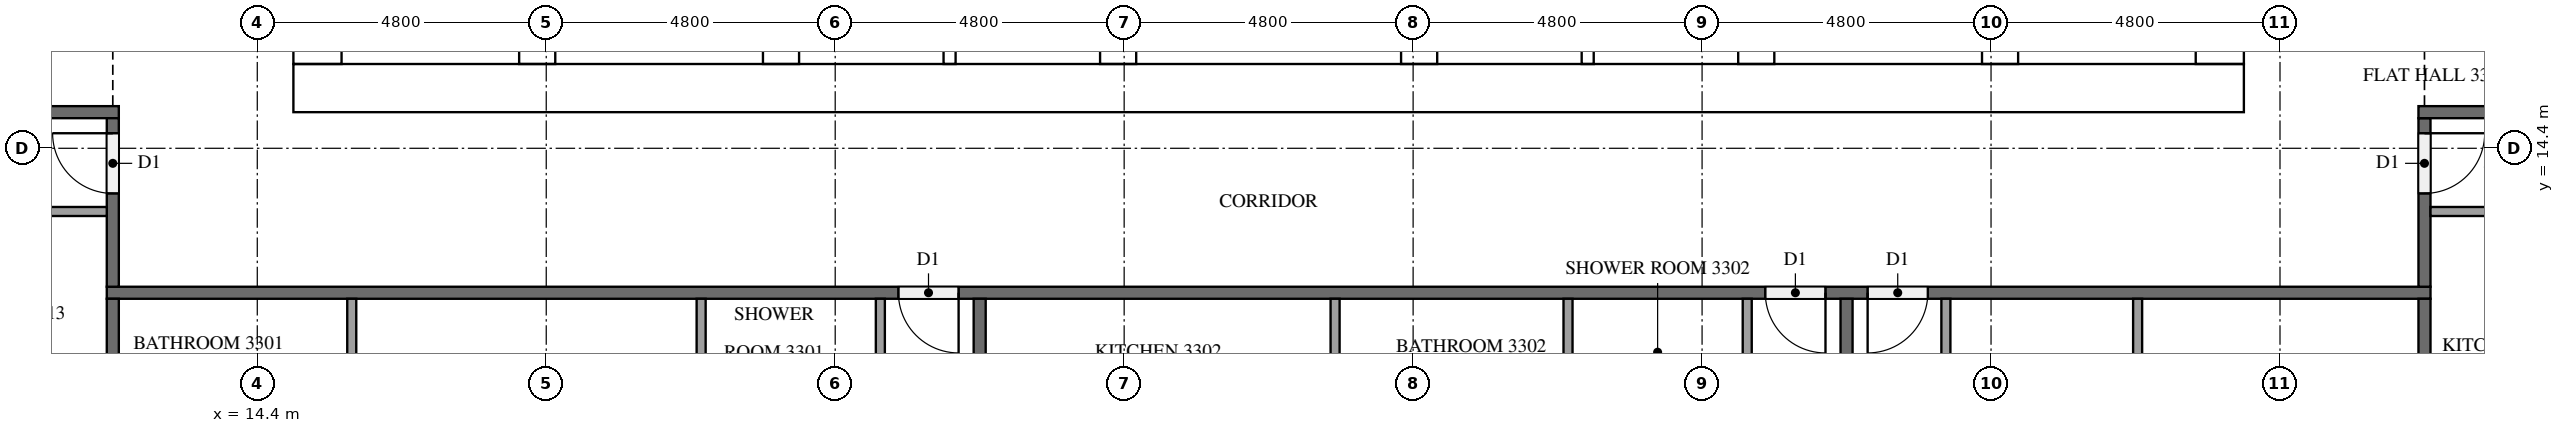
"""IFC4 building model, lengths in metres.
Left out: names, types, materials, properties, quantities, classifications, styles, units other than length and angle.
Written with IfcOpenShell. Run it as: python <this file> out.ifc"""

import sys

from ifc_helpers import new_model, si_unit, direction, frame, frame_2d, origin, place, context, subcontext, project, spatial, rectangle, extrude, element, fill, save


model = new_model("IFC4")
c1 = context("Model", 3, precision=1e-05, world=origin(), true_north=direction((0.0, 1.0)))
c2 = subcontext(c1, "Body", "Model", "MODEL_VIEW")
j1 = project(units=[si_unit("LENGTHUNIT", "METRE"), si_unit("PLANEANGLEUNIT", "RADIAN")], contexts=[c1])
p1 = place(None, origin())
s1 = spatial("IfcSite", under=j1, at=p1, CompositionType="ELEMENT")
p2 = place(p1, origin())
s2 = spatial("IfcBuilding", under=s1, at=p2, CompositionType="ELEMENT")
p3 = place(p2, frame((0.0, 0.0, 129.6)))
s3 = spatial("IfcBuildingStorey", under=s2, at=p3, CompositionType="ELEMENT", Elevation=129.6)
p4 = place(p3, frame((15.0, 15.4, 0.0), z_axis=(0.0, 0.0, 1.0), x_axis=(1.0, 0.0, 0.0)))
e1 = element("IfcWall", 1, at=p4, inside=s3, PredefinedType="SHEAR", context=c2, shape_type="SweptSolid", body=[
    extrude(rectangle(XDim=32.4, YDim=0.8, at=frame_2d((16.2, 0.0))), origin(), (0.0, 0.0, 1.0), 3.2),
])
p5 = place(p4, frame((15.3, 0.0, 0.0)))
e2 = element("IfcOpeningElement", 2, at=p5, cuts=e1, PredefinedType="OPENING", context=c2, shape_type="SweptSolid", body=[
    extrude(rectangle(XDim=1.8, YDim=2.1, at=frame_2d((0.9, 1.05))), frame((0.0, 0.41, 0.0), z_axis=(0.0, -1.0, 0.0), x_axis=(1.0, 0.0, 0.0)), (0.0, 0.0, 1.0), 0.82),
])
p6 = place(p3, frame((15.4, 15.8, 0.0), z_axis=(0.0, 0.0, 1.0), x_axis=(0.0, 1.0, 0.0)))
e3 = element("IfcWall", 3, at=p6, inside=s3, PredefinedType="SHEAR", context=c2, shape_type="SweptSolid", body=[
    extrude(rectangle(XDim=21.2, YDim=0.8, at=frame_2d((10.6, 0.0))), origin(), (0.0, 0.0, 1.0), 3.2),
])
p7 = place(p6, frame((4.96, 0.0, 0.0)))
e4 = element("IfcOpeningElement", 4, at=p7, cuts=e3, PredefinedType="OPENING", context=c2, shape_type="SweptSolid", body=[
    extrude(rectangle(XDim=1.2, YDim=2.1, at=frame_2d((0.6, 1.05))), frame((0.0, 0.41, 0.0), z_axis=(0.0, -1.0, 0.0), x_axis=(1.0, 0.0, 0.0)), (0.0, 0.0, 1.0), 0.82),
])
p8 = place(p3, frame((47.0, 15.8, 0.0), z_axis=(0.0, 0.0, 1.0), x_axis=(0.0, 1.0, 0.0)))
e5 = element("IfcWall", 5, at=p8, inside=s3, PredefinedType="SHEAR", context=c2, shape_type="SweptSolid", body=[
    extrude(rectangle(XDim=21.2, YDim=0.8, at=frame_2d((10.6, 0.0))), origin(), (0.0, 0.0, 1.0), 3.2),
])
p9 = place(p8, frame((10.3, 0.0, 0.0)))
e6 = element("IfcOpeningElement", 6, at=p9, cuts=e5, PredefinedType="OPENING", context=c2, shape_type="SweptSolid", body=[
    extrude(rectangle(XDim=1.2, YDim=2.1, at=frame_2d((0.6, 1.05))), frame((0.0, 0.41, 0.0), z_axis=(0.0, -1.0, 0.0), x_axis=(1.0, 0.0, 0.0)), (0.0, 0.0, 1.0), 0.82),
])
p10 = place(p3, frame((19.05, 15.8, 0.0), z_axis=(0.0, 0.0, 1.0), x_axis=(0.0, 1.0, 0.0)))
e7 = element("IfcWall", 7, at=p10, inside=s3, PredefinedType="SHEAR", context=c2, shape_type="SweptSolid", body=[
    extrude(rectangle(XDim=15.15, YDim=0.6, at=frame_2d((7.575, 0.0))), origin(), (0.0, 0.0, 1.0), 3.2),
])
p11 = place(p10, frame((9.65, 0.0, 0.0)))
e8 = element("IfcOpeningElement", 8, at=p11, cuts=e7, PredefinedType="OPENING", context=c2, shape_type="SweptSolid", body=[
    extrude(rectangle(XDim=1.1, YDim=2.1, at=frame_2d((0.55, 1.05))), frame((0.0, 0.31, 0.0), z_axis=(0.0, -1.0, 0.0), x_axis=(1.0, 0.0, 0.0)), (0.0, 0.0, 1.0), 0.62),
])
p12 = place(p10, frame((13.15, 0.0, 0.0)))
e9 = element("IfcOpeningElement", 9, at=p12, cuts=e7, PredefinedType="OPENING", context=c2, shape_type="SweptSolid", body=[
    extrude(rectangle(XDim=1.1, YDim=2.1, at=frame_2d((0.55, 1.05))), frame((0.0, 0.31, 0.0), z_axis=(0.0, -1.0, 0.0), x_axis=(1.0, 0.0, 0.0)), (0.0, 0.0, 1.0), 0.62),
])
p13 = place(p10, frame((0.4, 0.0, 0.0)))
e10 = element("IfcOpeningElement", 10, at=p13, cuts=e7, PredefinedType="OPENING", context=c2, shape_type="SweptSolid", body=[
    extrude(rectangle(XDim=1.2, YDim=2.1, at=frame_2d((0.6, 1.05))), frame((0.0, 0.31, 0.0), z_axis=(0.0, -1.0, 0.0), x_axis=(1.0, 0.0, 0.0)), (0.0, 0.0, 1.0), 0.62),
])
p14 = place(p3, frame((23.1, 15.8, 0.0), z_axis=(0.0, 0.0, 1.0), x_axis=(0.0, 1.0, 0.0)))
e11 = element("IfcWall", 11, at=p14, inside=s3, PredefinedType="SHEAR", context=c2, shape_type="SweptSolid", body=[
    extrude(rectangle(XDim=21.2, YDim=0.6, at=frame_2d((10.6, 0.0))), origin(), (0.0, 0.0, 1.0), 3.2),
])
p15 = place(p3, frame((39.3, 15.8, 0.0), z_axis=(0.0, 0.0, 1.0), x_axis=(0.0, 1.0, 0.0)))
e12 = element("IfcWall", 12, at=p15, inside=s3, PredefinedType="SHEAR", context=c2, shape_type="SweptSolid", body=[
    extrude(rectangle(XDim=8.45, YDim=0.6, at=frame_2d((4.225, 0.0))), origin(), (0.0, 0.0, 1.0), 3.2),
])
p16 = place(p3, frame((43.35, 15.8, 0.0), z_axis=(0.0, 0.0, 1.0), x_axis=(0.0, 1.0, 0.0)))
e13 = element("IfcWall", 13, at=p16, inside=s3, PredefinedType="SHEAR", context=c2, shape_type="SweptSolid", body=[
    extrude(rectangle(XDim=8.45, YDim=0.6, at=frame_2d((4.225, 0.0))), origin(), (0.0, 0.0, 1.0), 3.2),
])
p17 = place(p16, frame((0.4, 0.0, 0.0)))
e14 = element("IfcOpeningElement", 14, at=p17, cuts=e13, PredefinedType="OPENING", context=c2, shape_type="SweptSolid", body=[
    extrude(rectangle(XDim=1.2, YDim=2.1, at=frame_2d((0.6, 1.05))), frame((0.0, 0.31, 0.0), z_axis=(0.0, -1.0, 0.0), x_axis=(1.0, 0.0, 0.0)), (0.0, 0.0, 1.0), 0.62),
])
for number, where, z_axis, x_axis in (
    (15, (28.7, 15.8, 0.0), (0.0, 0.0, 1.0), (0.0, 1.0, 0.0)),
    (16, (33.7, 15.8, 0.0), (0.0, 0.0, 1.0), (0.0, 1.0, 0.0)),
):
    element("IfcWall", number, at=place(p3, frame(where, z_axis=z_axis, x_axis=x_axis)), inside=s3, PredefinedType="SHEAR", context=c2, shape_type="SweptSolid", body=[
        extrude(rectangle(XDim=2.65, YDim=0.6, at=frame_2d((1.325, 0.0))), origin(), (0.0, 0.0, 1.0), 3.2),
    ])
for number, where, z_axis, x_axis in (
    (17, (25.9, 15.8, 0.0), (0.0, 0.0, 1.0), (0.0, 1.0, 0.0)),
    (18, (36.5, 15.8, 0.0), (0.0, 0.0, 1.0), (0.0, 1.0, 0.0)),
):
    element("IfcWall", number, at=place(p3, frame(where, z_axis=z_axis, x_axis=x_axis)), inside=s3, PredefinedType="SOLIDWALL", context=c2, shape_type="SweptSolid", body=[
        extrude(rectangle(XDim=2.65, YDim=0.2, at=frame_2d((1.325, 0.0))), origin(), (0.0, 0.0, 1.0), 3.2),
    ])
p18 = place(p3, frame((50.5, 12.0, 0.0), z_axis=(0.0, 0.0, 1.0), x_axis=(-1.0, 0.0, 0.0)))
e19 = element("IfcWall", 19, at=p18, inside=s3, PredefinedType="PARTITIONING", context=c2, shape_type="SweptSolid", body=[
    extrude(rectangle(XDim=38.6, YDim=0.2, at=frame_2d((19.3, 0.0))), origin(), (0.0, 0.0, 1.0), 3.2),
])
p19 = place(p18, frame((24.45, 0.0, 0.0)))
e20 = element("IfcOpeningElement", 20, at=p19, cuts=e19, PredefinedType="OPENING", context=c2, shape_type="SweptSolid", body=[
    extrude(rectangle(XDim=1.0, YDim=2.1, at=frame_2d((0.5, 1.05))), frame((0.0, 0.11, 0.0), z_axis=(0.0, -1.0, 0.0), x_axis=(1.0, 0.0, 0.0)), (0.0, 0.0, 1.0), 0.22),
])
p20 = place(p18, frame((10.05, 0.0, 0.0)))
e21 = element("IfcOpeningElement", 21, at=p20, cuts=e19, PredefinedType="OPENING", context=c2, shape_type="SweptSolid", body=[
    extrude(rectangle(XDim=1.0, YDim=2.1, at=frame_2d((0.5, 1.05))), frame((0.0, 0.11, 0.0), z_axis=(0.0, -1.0, 0.0), x_axis=(1.0, 0.0, 0.0)), (0.0, 0.0, 1.0), 0.22),
])
p21 = place(p18, frame((8.35, 0.0, 0.0)))
e22 = element("IfcOpeningElement", 22, at=p21, cuts=e19, PredefinedType="OPENING", context=c2, shape_type="SweptSolid", body=[
    extrude(rectangle(XDim=1.0, YDim=2.1, at=frame_2d((0.5, 1.05))), frame((0.0, 0.11, 0.0), z_axis=(0.0, -1.0, 0.0), x_axis=(1.0, 0.0, 0.0)), (0.0, 0.0, 1.0), 0.22),
])
p22 = place(p3, frame((50.4, 14.9, 0.0), z_axis=(0.0, 0.0, 1.0), x_axis=(0.0, -1.0, 0.0)))
e23 = element("IfcWall", 23, at=p22, inside=s3, PredefinedType="PARTITIONING", context=c2, shape_type="SweptSolid", body=[
    extrude(rectangle(XDim=2.8, YDim=0.2, at=frame_2d((1.4, 0.0))), origin(), (0.0, 0.0, 1.0), 3.2),
])
p23 = place(p22, frame((0.25, 0.0, 0.0)))
e24 = element("IfcOpeningElement", 24, at=p23, cuts=e23, PredefinedType="OPENING", context=c2, shape_type="SweptSolid", body=[
    extrude(rectangle(XDim=1.0, YDim=2.1, at=frame_2d((0.5, 1.05))), frame((0.0, 0.11, 0.0), z_axis=(0.0, -1.0, 0.0), x_axis=(1.0, 0.0, 0.0)), (0.0, 0.0, 1.0), 0.22),
])
p24 = place(p3, frame((50.3, 15.0, 0.0), z_axis=(0.0, 0.0, 1.0), x_axis=(1.0, 0.0, 0.0)))
e25 = element("IfcWall", 25, at=p24, inside=s3, PredefinedType="PARTITIONING", context=c2, shape_type="SweptSolid", body=[
    extrude(rectangle(XDim=2.2, YDim=0.2, at=frame_2d((1.1, 0.0))), origin(), (0.0, 0.0, 1.0), 3.2),
])
p25 = place(p3, frame((9.9, 15.0, 0.0), z_axis=(0.0, 0.0, 1.0), x_axis=(1.0, 0.0, 0.0)))
e26 = element("IfcWall", 26, at=p25, inside=s3, PredefinedType="PARTITIONING", context=c2, shape_type="SweptSolid", body=[
    extrude(rectangle(XDim=2.2, YDim=0.2, at=frame_2d((1.1, 0.0))), origin(), (0.0, 0.0, 1.0), 3.2),
])
p26 = place(p3, frame((12.0, 12.1, 0.0), z_axis=(0.0, 0.0, 1.0), x_axis=(0.0, 1.0, 0.0)))
e27 = element("IfcWall", 27, at=p26, inside=s3, PredefinedType="PARTITIONING", context=c2, shape_type="SweptSolid", body=[
    extrude(rectangle(XDim=2.8, YDim=0.2, at=frame_2d((1.4, 0.0))), origin(), (0.0, 0.0, 1.0), 3.2),
])
p27 = place(p26, frame((1.55, 0.0, 0.0)))
e28 = element("IfcOpeningElement", 28, at=p27, cuts=e27, PredefinedType="OPENING", context=c2, shape_type="SweptSolid", body=[
    extrude(rectangle(XDim=1.0, YDim=2.1, at=frame_2d((0.5, 1.05))), frame((0.0, 0.11, 0.0), z_axis=(0.0, -1.0, 0.0), x_axis=(1.0, 0.0, 0.0)), (0.0, 0.0, 1.0), 0.22),
])
for number, where, z_axis, x_axis in (
    (29, (26.4, 11.9, 0.0), (0.0, 0.0, 1.0), (0.0, -1.0, 0.0)),
    (30, (12.0, 4.9, 0.0), (0.0, 0.0, 1.0), (0.0, 1.0, 0.0)),
    (31, (40.8, 11.9, 0.0), (0.0, 0.0, 1.0), (0.0, -1.0, 0.0)),
    (32, (50.4, 11.9, 0.0), (0.0, 0.0, 1.0), (0.0, -1.0, 0.0)),
):
    element("IfcWall", number, at=place(p3, frame(where, z_axis=z_axis, x_axis=x_axis)), inside=s3, PredefinedType="PARTITIONING", context=c2, shape_type="SweptSolid", body=[
        extrude(rectangle(XDim=7.0, YDim=0.2, at=frame_2d((3.5, 0.0))), origin(), (0.0, 0.0, 1.0), 3.2),
    ])
for number, where, z_axis, x_axis in (
    (33, (21.773, 11.9, 0.0), (0.0, 0.0, 1.0), (0.0, -1.0, 0.0)),
    (34, (15.969, 11.9, 0.0), (0.0, 0.0, 1.0), (0.0, -1.0, 0.0)),
):
    element("IfcWall", number, at=place(p3, frame(where, z_axis=z_axis, x_axis=x_axis)), inside=s3, PredefinedType="PARTITIONING", context=c2, shape_type="SweptSolid", body=[
        extrude(rectangle(XDim=2.075, YDim=0.15, at=frame_2d((1.038, 0.0))), origin(), (0.0, 0.0, 1.0), 3.2),
    ])
p28 = place(p3, frame((24.75, 11.9, 0.0), z_axis=(0.0, 0.0, 1.0), x_axis=(0.0, -1.0, 0.0)))
e35 = element("IfcWall", 35, at=p28, inside=s3, PredefinedType="PARTITIONING", context=c2, shape_type="SweptSolid", body=[
    extrude(rectangle(XDim=2.225, YDim=0.15, at=frame_2d((1.112, 0.0))), origin(), (0.0, 0.0, 1.0), 3.2),
])
for number, where, z_axis, x_axis in (
    (36, (36.173, 11.9, 0.0), (0.0, 0.0, 1.0), (0.0, -1.0, 0.0)),
    (37, (32.304, 11.9, 0.0), (0.0, 0.0, 1.0), (0.0, -1.0, 0.0)),
):
    element("IfcWall", number, at=place(p3, frame(where, z_axis=z_axis, x_axis=x_axis)), inside=s3, PredefinedType="PARTITIONING", context=c2, shape_type="SweptSolid", body=[
        extrude(rectangle(XDim=1.775, YDim=0.15, at=frame_2d((0.887, 0.0))), origin(), (0.0, 0.0, 1.0), 3.2),
    ])
p29 = place(p3, frame((39.15, 11.9, 0.0), z_axis=(0.0, 0.0, 1.0), x_axis=(0.0, -1.0, 0.0)))
e38 = element("IfcWall", 38, at=p29, inside=s3, PredefinedType="PARTITIONING", context=c2, shape_type="SweptSolid", body=[
    extrude(rectangle(XDim=1.925, YDim=0.15, at=frame_2d((0.962, 0.0))), origin(), (0.0, 0.0, 1.0), 3.2),
])
p30 = place(p3, frame((45.635, 11.9, 0.0), z_axis=(0.0, 0.0, 1.0), x_axis=(0.0, -1.0, 0.0)))
e39 = element("IfcWall", 39, at=p30, inside=s3, PredefinedType="PARTITIONING", context=c2, shape_type="SweptSolid", body=[
    extrude(rectangle(XDim=2.075, YDim=0.15, at=frame_2d((1.038, 0.0))), origin(), (0.0, 0.0, 1.0), 3.2),
])
p31 = place(p3, frame((42.45, 11.9, 0.0), z_axis=(0.0, 0.0, 1.0), x_axis=(0.0, -1.0, 0.0)))
e40 = element("IfcWall", 40, at=p31, inside=s3, PredefinedType="PARTITIONING", context=c2, shape_type="SweptSolid", body=[
    extrude(rectangle(XDim=2.225, YDim=0.15, at=frame_2d((1.112, 0.0))), origin(), (0.0, 0.0, 1.0), 3.2),
])
p32 = place(p3, frame((50.5, 13.35, 0.0), z_axis=(0.0, 0.0, 1.0), x_axis=(1.0, 0.0, 0.0)))
e41 = element("IfcWall", 41, at=p32, inside=s3, PredefinedType="PARTITIONING", context=c2, shape_type="SweptSolid", body=[
    extrude(rectangle(XDim=1.925, YDim=0.15, at=frame_2d((0.962, 0.0))), origin(), (0.0, 0.0, 1.0), 3.2),
])
p33 = place(p3, frame((11.9, 13.35, 0.0), z_axis=(0.0, 0.0, 1.0), x_axis=(-1.0, 0.0, 0.0)))
e42 = element("IfcWall", 42, at=p33, inside=s3, PredefinedType="PARTITIONING", context=c2, shape_type="SweptSolid", body=[
    extrude(rectangle(XDim=4.025, YDim=0.15, at=frame_2d((2.012, 0.0))), origin(), (0.0, 0.0, 1.0), 3.2),
])
p34 = place(p5, frame((1.8, 0.0, 0.0), z_axis=(0.0, 0.0, 1.0), x_axis=(-1.0, 0.0, 0.0)))
e43 = element("IfcDoor", 43, at=p34, inside=s3, OperationType="DOUBLE_DOOR_SINGLE_SWING", PredefinedType="DOOR", context=c2, shape_type="SweptSolid", body=[
    extrude(rectangle(XDim=1.8, YDim=2.1, at=frame_2d((0.9, 1.05))), frame((0.0, 0.025, 0.0), z_axis=(0.0, -1.0, 0.0), x_axis=(1.0, 0.0, 0.0)), (0.0, 0.0, 1.0), 0.05),
])
fill(e2, e43)
p35 = place(p19, origin())
e44 = element("IfcDoor", 44, at=p35, inside=s3, OperationType="SINGLE_SWING_LEFT", PredefinedType="DOOR", context=c2, shape_type="SweptSolid", body=[
    extrude(rectangle(XDim=1.0, YDim=2.1, at=frame_2d((0.5, 1.05))), frame((0.0, 0.025, 0.0), z_axis=(0.0, -1.0, 0.0), x_axis=(1.0, 0.0, 0.0)), (0.0, 0.0, 1.0), 0.05),
])
fill(e20, e44)
p36 = place(p20, origin())
e45 = element("IfcDoor", 45, at=p36, inside=s3, OperationType="SINGLE_SWING_LEFT", PredefinedType="DOOR", context=c2, shape_type="SweptSolid", body=[
    extrude(rectangle(XDim=1.0, YDim=2.1, at=frame_2d((0.5, 1.05))), frame((0.0, 0.025, 0.0), z_axis=(0.0, -1.0, 0.0), x_axis=(1.0, 0.0, 0.0)), (0.0, 0.0, 1.0), 0.05),
])
fill(e21, e45)
p37 = place(p21, origin())
e46 = element("IfcDoor", 46, at=p37, inside=s3, OperationType="SINGLE_SWING_RIGHT", PredefinedType="DOOR", context=c2, shape_type="SweptSolid", body=[
    extrude(rectangle(XDim=1.0, YDim=2.1, at=frame_2d((0.5, 1.05))), frame((0.0, 0.025, 0.0), z_axis=(0.0, -1.0, 0.0), x_axis=(1.0, 0.0, 0.0)), (0.0, 0.0, 1.0), 0.05),
])
fill(e22, e46)
p38 = place(p23, origin())
e47 = element("IfcDoor", 47, at=p38, inside=s3, OperationType="SINGLE_SWING_LEFT", PredefinedType="DOOR", context=c2, shape_type="SweptSolid", body=[
    extrude(rectangle(XDim=1.0, YDim=2.1, at=frame_2d((0.5, 1.05))), frame((0.0, 0.025, 0.0), z_axis=(0.0, -1.0, 0.0), x_axis=(1.0, 0.0, 0.0)), (0.0, 0.0, 1.0), 0.05),
])
fill(e24, e47)
p39 = place(p27, origin())
e48 = element("IfcDoor", 48, at=p39, inside=s3, OperationType="SINGLE_SWING_RIGHT", PredefinedType="DOOR", context=c2, shape_type="SweptSolid", body=[
    extrude(rectangle(XDim=1.0, YDim=2.1, at=frame_2d((0.5, 1.05))), frame((0.0, 0.025, 0.0), z_axis=(0.0, -1.0, 0.0), x_axis=(1.0, 0.0, 0.0)), (0.0, 0.0, 1.0), 0.05),
])
fill(e28, e48)
save(model, sys.argv[1])
